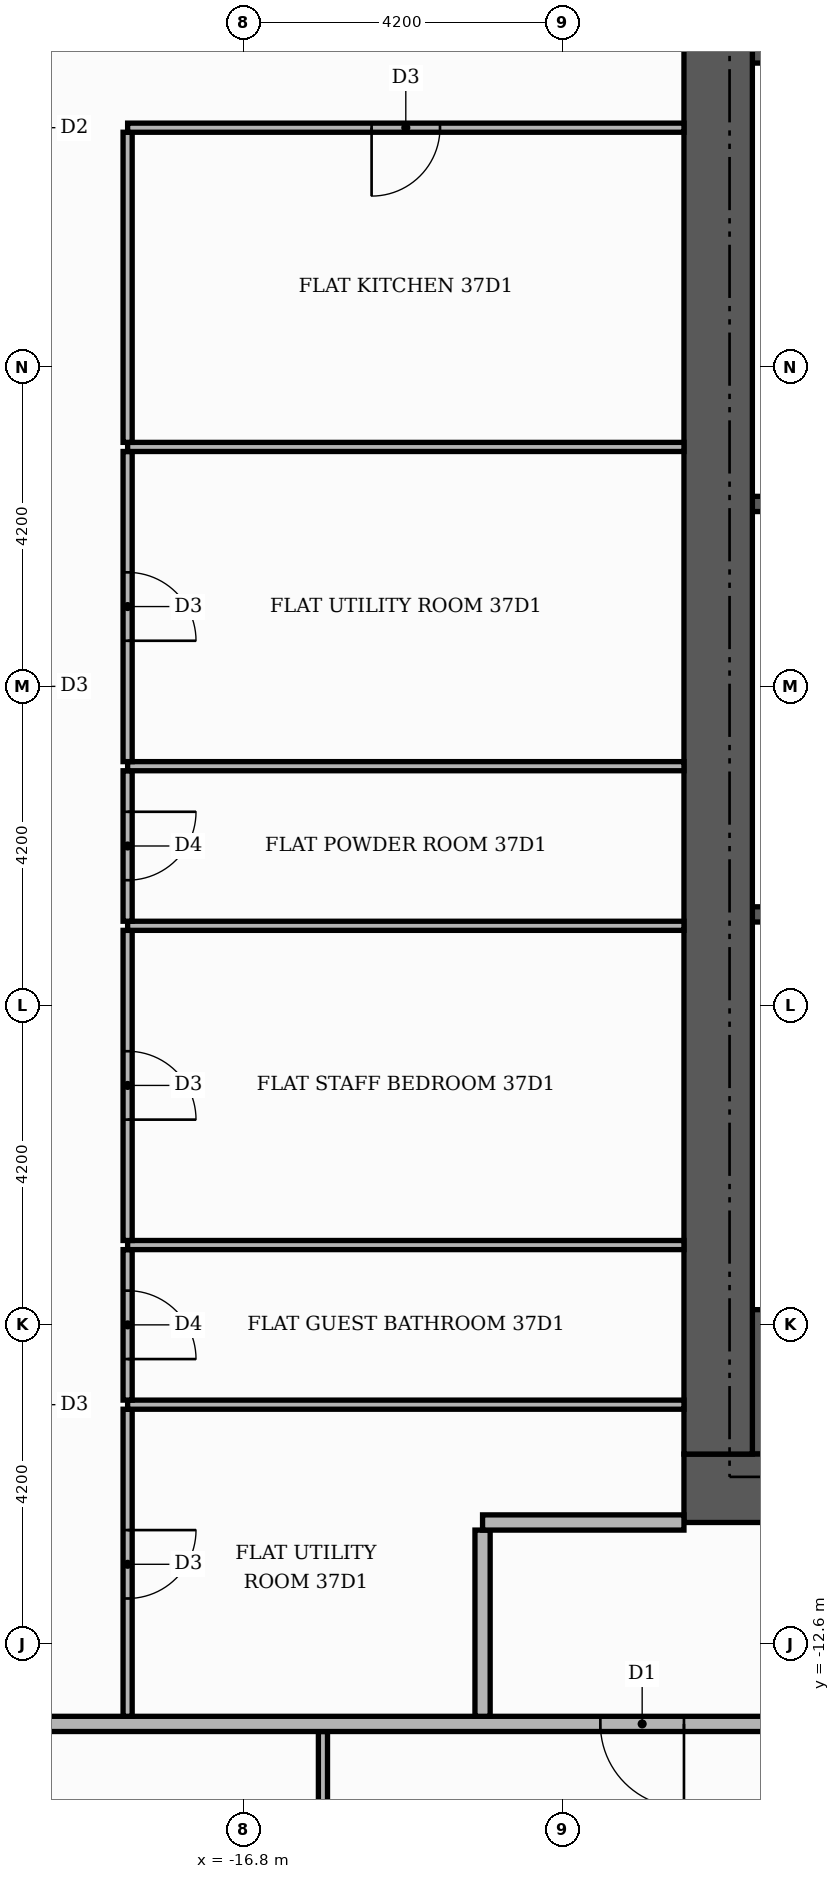
"""IFC4 building model, lengths in metres.
Left out: names, types, materials, properties, quantities, classifications, styles, units other than length and angle.
Written with IfcOpenShell. Run it as: python <this file> out.ifc"""

import sys

from ifc_helpers import new_model, si_unit, direction, frame, frame_2d, origin, place, context, subcontext, project, spatial, rectangle, extrude, element, fill, save


model = new_model("IFC4")
c1 = context("Model", 3, precision=1e-05, world=origin(), true_north=direction((0.0, 1.0)))
c2 = subcontext(c1, "Body", "Model", "MODEL_VIEW")
j1 = project(units=[si_unit("LENGTHUNIT", "METRE"), si_unit("PLANEANGLEUNIT", "RADIAN")], contexts=[c1])
p1 = place(None, origin())
s1 = spatial("IfcSite", under=j1, at=p1, CompositionType="ELEMENT")
p2 = place(p1, origin())
s2 = spatial("IfcBuilding", under=s1, at=p2, CompositionType="ELEMENT")
p3 = place(p2, frame((0.0, 0.0, 157.2)))
s3 = spatial("IfcBuildingStorey", under=s2, at=p3, CompositionType="ELEMENT", Elevation=157.2)
for number, where, z_axis, x_axis in (
    (1, (-10.1, -9.15, 0.0), (0.0, 0.0, 1.0), (1.0, 0.0, 0.0)),
    (2, (-10.1, 9.15, 0.0), (0.0, 0.0, 1.0), (1.0, 0.0, 0.0)),
):
    element("IfcWall", number, at=place(p3, frame(where, z_axis=z_axis, x_axis=x_axis)), inside=s3, PredefinedType="SHEAR", context=c2, shape_type="SweptSolid", body=[
        extrude(rectangle(XDim=4.6, YDim=1.9, at=frame_2d((2.3, 0.0))), origin(), (0.0, 0.0, 1.0), 3.48),
    ])
for number, where, z_axis, x_axis in (
    (3, (-10.1, -3.0, 0.0), (0.0, 0.0, 1.0), (1.0, 0.0, 0.0)),
    (4, (-10.1, 2.4, 0.0), (0.0, 0.0, 1.0), (1.0, 0.0, 0.0)),
):
    element("IfcWall", number, at=place(p3, frame(where, z_axis=z_axis, x_axis=x_axis)), inside=s3, PredefinedType="SHEAR", context=c2, shape_type="SweptSolid", body=[
        extrude(rectangle(XDim=0.9, YDim=0.2, at=frame_2d((0.45, 0.0))), origin(), (0.0, 0.0, 1.0), 3.48),
    ])
p4 = place(p3, frame((-11.0, -10.55, 0.0), z_axis=(0.0, 0.0, 1.0), x_axis=(1.0, 0.0, 0.0)))
e5 = element("IfcWall", 5, at=p4, inside=s3, PredefinedType="SHEAR", context=c2, shape_type="SweptSolid", body=[
    extrude(rectangle(XDim=22.0, YDim=0.9, at=frame_2d((11.0, 0.0))), origin(), (0.0, 0.0, 1.0), 3.48),
])
p5 = place(p4, frame((7.4, 0.0, 0.0)))
e6 = element("IfcOpeningElement", 6, at=p5, cuts=e5, PredefinedType="OPENING", context=c2, shape_type="SweptSolid", body=[
    extrude(rectangle(XDim=1.8, YDim=2.2, at=frame_2d((0.9, 1.1))), frame((0.0, 0.46, 0.0), z_axis=(0.0, -1.0, 0.0), x_axis=(1.0, 0.0, 0.0)), (0.0, 0.0, 1.0), 0.92),
])
p6 = place(p3, frame((-10.55, -10.1, 0.0), z_axis=(0.0, 0.0, 1.0), x_axis=(0.0, 1.0, 0.0)))
e7 = element("IfcWall", 7, at=p6, inside=s3, PredefinedType="SHEAR", context=c2, shape_type="SweptSolid", body=[
    extrude(rectangle(XDim=20.2, YDim=0.9, at=frame_2d((10.1, 0.0))), origin(), (0.0, 0.0, 1.0), 3.48),
])
p7 = place(p3, frame((-15.75, -20.06, 0.0), z_axis=(0.0, 0.0, 1.0), x_axis=(0.0, 1.0, 0.0)))
e8 = element("IfcWall", 8, at=p7, inside=s3, PredefinedType="PARTITIONING", context=c2, shape_type="SweptSolid", body=[
    extrude(rectangle(XDim=6.31, YDim=0.12, at=frame_2d((3.155, 0.0))), origin(), (0.0, 0.0, 1.0), 3.48),
])
p8 = place(p7, frame((2.675, 0.0, 0.0)))
e9 = element("IfcOpeningElement", 9, at=p8, cuts=e8, PredefinedType="OPENING", context=c2, shape_type="SweptSolid", body=[
    extrude(rectangle(XDim=1.0, YDim=2.1, at=frame_2d((0.5, 1.05))), frame((0.0, 0.07, 0.0), z_axis=(0.0, -1.0, 0.0), x_axis=(1.0, 0.0, 0.0)), (0.0, 0.0, 1.0), 0.14),
])
p9 = place(p3, frame((-25.42, -13.65, 0.0), z_axis=(0.0, 0.0, 1.0), x_axis=(1.0, 0.0, 0.0)))
e10 = element("IfcWall", 10, at=p9, inside=s3, PredefinedType="PARTITIONING", context=c2, shape_type="SweptSolid", body=[
    extrude(rectangle(XDim=39.07, YDim=0.2, at=frame_2d((19.535, 0.0))), origin(), (0.0, 0.0, 1.0), 3.48),
])
p10 = place(p9, frame((13.32, 0.0, 0.0)))
e11 = element("IfcOpeningElement", 11, at=p10, cuts=e10, PredefinedType="OPENING", context=c2, shape_type="SweptSolid", body=[
    extrude(rectangle(XDim=1.1, YDim=2.4, at=frame_2d((0.55, 1.2))), frame((0.0, 0.11, 0.0), z_axis=(0.0, -1.0, 0.0), x_axis=(1.0, 0.0, 0.0)), (0.0, 0.0, 1.0), 0.22),
])
p11 = place(p9, frame((21.72, 0.0, 0.0)))
e12 = element("IfcOpeningElement", 12, at=p11, cuts=e10, PredefinedType="OPENING", context=c2, shape_type="SweptSolid", body=[
    extrude(rectangle(XDim=1.1, YDim=2.4, at=frame_2d((0.55, 1.2))), frame((0.0, 0.11, 0.0), z_axis=(0.0, -1.0, 0.0), x_axis=(1.0, 0.0, 0.0)), (0.0, 0.0, 1.0), 0.22),
])
p12 = place(p3, frame((-18.32, -13.55, 0.0), z_axis=(0.0, 0.0, 1.0), x_axis=(0.0, 1.0, 0.0)))
e13 = element("IfcWall", 13, at=p12, inside=s3, PredefinedType="PARTITIONING", context=c2, shape_type="SweptSolid", body=[
    extrude(rectangle(XDim=4.04, YDim=0.12, at=frame_2d((2.02, 0.0))), origin(), (0.0, 0.0, 1.0), 3.48),
])
p13 = place(p12, frame((1.55, 0.0, 0.0)))
e14 = element("IfcOpeningElement", 14, at=p13, cuts=e13, PredefinedType="OPENING", context=c2, shape_type="SweptSolid", body=[
    extrude(rectangle(XDim=0.9, YDim=2.1, at=frame_2d((0.45, 1.05))), frame((0.0, 0.07, 0.0), z_axis=(0.0, -1.0, 0.0), x_axis=(1.0, 0.0, 0.0)), (0.0, 0.0, 1.0), 0.14),
])
p14 = place(p3, frame((-13.65, -13.55, 0.0), z_axis=(0.0, 0.0, 1.0), x_axis=(0.0, 1.0, 0.0)))
e15 = element("IfcWall", 15, at=p14, inside=s3, PredefinedType="PARTITIONING", context=c2, shape_type="SweptSolid", body=[
    extrude(rectangle(XDim=2.45, YDim=0.2, at=frame_2d((1.225, 0.0))), origin(), (0.0, 0.0, 1.0), 3.48),
])
p15 = place(p3, frame((-13.65, -11.0, 0.0), z_axis=(0.0, 0.0, 1.0), x_axis=(1.0, 0.0, 0.0)))
e16 = element("IfcWall", 16, at=p15, inside=s3, PredefinedType="PARTITIONING", context=c2, shape_type="SweptSolid", body=[
    extrude(rectangle(XDim=2.65, YDim=0.2, at=frame_2d((1.325, 0.0))), origin(), (0.0, 0.0, 1.0), 3.48),
])
p16 = place(p3, frame((-18.32, -9.45, 0.0), z_axis=(0.0, 0.0, 1.0), x_axis=(1.0, 0.0, 0.0)))
e17 = element("IfcWall", 17, at=p16, inside=s3, PredefinedType="PARTITIONING", context=c2, shape_type="SweptSolid", body=[
    extrude(rectangle(XDim=7.32, YDim=0.12, at=frame_2d((3.66, 0.0))), origin(), (0.0, 0.0, 1.0), 3.48),
])
p17 = place(p3, frame((-18.32, -9.39, 0.0), z_axis=(0.0, 0.0, 1.0), x_axis=(0.0, 1.0, 0.0)))
e18 = element("IfcWall", 18, at=p17, inside=s3, PredefinedType="PARTITIONING", context=c2, shape_type="SweptSolid", body=[
    extrude(rectangle(XDim=1.98, YDim=0.12, at=frame_2d((0.99, 0.0))), origin(), (0.0, 0.0, 1.0), 3.48),
])
p18 = place(p17, frame((0.54, 0.0, 0.0)))
e19 = element("IfcOpeningElement", 19, at=p18, cuts=e18, PredefinedType="OPENING", context=c2, shape_type="SweptSolid", body=[
    extrude(rectangle(XDim=0.9, YDim=2.1, at=frame_2d((0.45, 1.05))), frame((0.0, 0.07, 0.0), z_axis=(0.0, -1.0, 0.0), x_axis=(1.0, 0.0, 0.0)), (0.0, 0.0, 1.0), 0.14),
])
p19 = place(p3, frame((-18.32, -7.35, 0.0), z_axis=(0.0, 0.0, 1.0), x_axis=(1.0, 0.0, 0.0)))
e20 = element("IfcWall", 20, at=p19, inside=s3, PredefinedType="PARTITIONING", context=c2, shape_type="SweptSolid", body=[
    extrude(rectangle(XDim=7.32, YDim=0.12, at=frame_2d((3.66, 0.0))), origin(), (0.0, 0.0, 1.0), 3.48),
])
p20 = place(p3, frame((-18.32, -7.29, 0.0), z_axis=(0.0, 0.0, 1.0), x_axis=(0.0, 1.0, 0.0)))
e21 = element("IfcWall", 21, at=p20, inside=s3, PredefinedType="PARTITIONING", context=c2, shape_type="SweptSolid", body=[
    extrude(rectangle(XDim=4.08, YDim=0.12, at=frame_2d((2.04, 0.0))), origin(), (0.0, 0.0, 1.0), 3.48),
])
p21 = place(p20, frame((1.59, 0.0, 0.0)))
e22 = element("IfcOpeningElement", 22, at=p21, cuts=e21, PredefinedType="OPENING", context=c2, shape_type="SweptSolid", body=[
    extrude(rectangle(XDim=0.9, YDim=2.1, at=frame_2d((0.45, 1.05))), frame((0.0, 0.07, 0.0), z_axis=(0.0, -1.0, 0.0), x_axis=(1.0, 0.0, 0.0)), (0.0, 0.0, 1.0), 0.14),
])
p22 = place(p3, frame((-18.32, -3.15, 0.0), z_axis=(0.0, 0.0, 1.0), x_axis=(1.0, 0.0, 0.0)))
e23 = element("IfcWall", 23, at=p22, inside=s3, PredefinedType="PARTITIONING", context=c2, shape_type="SweptSolid", body=[
    extrude(rectangle(XDim=7.32, YDim=0.12, at=frame_2d((3.66, 0.0))), origin(), (0.0, 0.0, 1.0), 3.48),
])
p23 = place(p3, frame((-18.32, -3.09, 0.0), z_axis=(0.0, 0.0, 1.0), x_axis=(0.0, 1.0, 0.0)))
e24 = element("IfcWall", 24, at=p23, inside=s3, PredefinedType="PARTITIONING", context=c2, shape_type="SweptSolid", body=[
    extrude(rectangle(XDim=1.98, YDim=0.12, at=frame_2d((0.99, 0.0))), origin(), (0.0, 0.0, 1.0), 3.48),
])
p24 = place(p23, frame((0.54, 0.0, 0.0)))
e25 = element("IfcOpeningElement", 25, at=p24, cuts=e24, PredefinedType="OPENING", context=c2, shape_type="SweptSolid", body=[
    extrude(rectangle(XDim=0.9, YDim=2.1, at=frame_2d((0.45, 1.05))), frame((0.0, 0.07, 0.0), z_axis=(0.0, -1.0, 0.0), x_axis=(1.0, 0.0, 0.0)), (0.0, 0.0, 1.0), 0.14),
])
p25 = place(p3, frame((-18.32, -1.05, 0.0), z_axis=(0.0, 0.0, 1.0), x_axis=(1.0, 0.0, 0.0)))
e26 = element("IfcWall", 26, at=p25, inside=s3, PredefinedType="PARTITIONING", context=c2, shape_type="SweptSolid", body=[
    extrude(rectangle(XDim=7.32, YDim=0.12, at=frame_2d((3.66, 0.0))), origin(), (0.0, 0.0, 1.0), 3.48),
])
p26 = place(p3, frame((-18.32, -0.99, 0.0), z_axis=(0.0, 0.0, 1.0), x_axis=(0.0, 1.0, 0.0)))
e27 = element("IfcWall", 27, at=p26, inside=s3, PredefinedType="PARTITIONING", context=c2, shape_type="SweptSolid", body=[
    extrude(rectangle(XDim=4.08, YDim=0.12, at=frame_2d((2.04, 0.0))), origin(), (0.0, 0.0, 1.0), 3.48),
])
p27 = place(p26, frame((1.59, 0.0, 0.0)))
e28 = element("IfcOpeningElement", 28, at=p27, cuts=e27, PredefinedType="OPENING", context=c2, shape_type="SweptSolid", body=[
    extrude(rectangle(XDim=0.9, YDim=2.1, at=frame_2d((0.45, 1.05))), frame((0.0, 0.07, 0.0), z_axis=(0.0, -1.0, 0.0), x_axis=(1.0, 0.0, 0.0)), (0.0, 0.0, 1.0), 0.14),
])
p28 = place(p3, frame((-18.32, 3.15, 0.0), z_axis=(0.0, 0.0, 1.0), x_axis=(1.0, 0.0, 0.0)))
e29 = element("IfcWall", 29, at=p28, inside=s3, PredefinedType="PARTITIONING", context=c2, shape_type="SweptSolid", body=[
    extrude(rectangle(XDim=7.32, YDim=0.12, at=frame_2d((3.66, 0.0))), origin(), (0.0, 0.0, 1.0), 3.48),
])
p29 = place(p3, frame((-18.32, 3.21, 0.0), z_axis=(0.0, 0.0, 1.0), x_axis=(0.0, 1.0, 0.0)))
e30 = element("IfcWall", 30, at=p29, inside=s3, PredefinedType="PARTITIONING", context=c2, shape_type="SweptSolid", body=[
    extrude(rectangle(XDim=4.08, YDim=0.12, at=frame_2d((2.04, 0.0))), origin(), (0.0, 0.0, 1.0), 3.48),
])
p30 = place(p3, frame((-18.32, 7.35, 0.0), z_axis=(0.0, 0.0, 1.0), x_axis=(1.0, 0.0, 0.0)))
e31 = element("IfcWall", 31, at=p30, inside=s3, PredefinedType="PARTITIONING", context=c2, shape_type="SweptSolid", body=[
    extrude(rectangle(XDim=7.32, YDim=0.12, at=frame_2d((3.66, 0.0))), origin(), (0.0, 0.0, 1.0), 3.48),
])
p31 = place(p30, frame((3.21, 0.0, 0.0)))
e32 = element("IfcOpeningElement", 32, at=p31, cuts=e31, PredefinedType="OPENING", context=c2, shape_type="SweptSolid", body=[
    extrude(rectangle(XDim=0.9, YDim=2.1, at=frame_2d((0.45, 1.05))), frame((0.0, 0.07, 0.0), z_axis=(0.0, -1.0, 0.0), x_axis=(1.0, 0.0, 0.0)), (0.0, 0.0, 1.0), 0.14),
])
p32 = place(p10, frame((1.1, 0.0, 0.0), z_axis=(0.0, 0.0, 1.0), x_axis=(-1.0, 0.0, 0.0)))
e33 = element("IfcDoor", 33, at=p32, inside=s3, OperationType="SINGLE_SWING_RIGHT", PredefinedType="DOOR", context=c2, shape_type="SweptSolid", body=[
    extrude(rectangle(XDim=1.1, YDim=2.4, at=frame_2d((0.55, 1.2))), frame((0.0, 0.025, 0.0), z_axis=(0.0, -1.0, 0.0), x_axis=(1.0, 0.0, 0.0)), (0.0, 0.0, 1.0), 0.05),
])
fill(e11, e33)
p33 = place(p31, frame((0.9, 0.0, 0.0), z_axis=(0.0, 0.0, 1.0), x_axis=(-1.0, 0.0, 0.0)))
e34 = element("IfcDoor", 34, at=p33, inside=s3, OperationType="SINGLE_SWING_LEFT", PredefinedType="DOOR", context=c2, shape_type="SweptSolid", body=[
    extrude(rectangle(XDim=0.9, YDim=2.1, at=frame_2d((0.45, 1.05))), frame((0.0, 0.025, 0.0), z_axis=(0.0, -1.0, 0.0), x_axis=(1.0, 0.0, 0.0)), (0.0, 0.0, 1.0), 0.05),
])
fill(e32, e34)
p34 = place(p27, frame((0.9, 0.0, 0.0), z_axis=(0.0, 0.0, 1.0), x_axis=(-1.0, 0.0, 0.0)))
e35 = element("IfcDoor", 35, at=p34, inside=s3, OperationType="SINGLE_SWING_LEFT", PredefinedType="DOOR", context=c2, shape_type="SweptSolid", body=[
    extrude(rectangle(XDim=0.9, YDim=2.1, at=frame_2d((0.45, 1.05))), frame((0.0, 0.025, 0.0), z_axis=(0.0, -1.0, 0.0), x_axis=(1.0, 0.0, 0.0)), (0.0, 0.0, 1.0), 0.05),
])
fill(e28, e35)
p35 = place(p24, frame((0.9, 0.0, 0.0), z_axis=(0.0, 0.0, 1.0), x_axis=(-1.0, 0.0, 0.0)))
e36 = element("IfcDoor", 36, at=p35, inside=s3, OperationType="SINGLE_SWING_RIGHT", PredefinedType="DOOR", context=c2, shape_type="SweptSolid", body=[
    extrude(rectangle(XDim=0.9, YDim=2.1, at=frame_2d((0.45, 1.05))), frame((0.0, 0.025, 0.0), z_axis=(0.0, -1.0, 0.0), x_axis=(1.0, 0.0, 0.0)), (0.0, 0.0, 1.0), 0.05),
])
fill(e25, e36)
p36 = place(p21, frame((0.9, 0.0, 0.0), z_axis=(0.0, 0.0, 1.0), x_axis=(-1.0, 0.0, 0.0)))
e37 = element("IfcDoor", 37, at=p36, inside=s3, OperationType="SINGLE_SWING_LEFT", PredefinedType="DOOR", context=c2, shape_type="SweptSolid", body=[
    extrude(rectangle(XDim=0.9, YDim=2.1, at=frame_2d((0.45, 1.05))), frame((0.0, 0.025, 0.0), z_axis=(0.0, -1.0, 0.0), x_axis=(1.0, 0.0, 0.0)), (0.0, 0.0, 1.0), 0.05),
])
fill(e22, e37)
p37 = place(p18, frame((0.9, 0.0, 0.0), z_axis=(0.0, 0.0, 1.0), x_axis=(-1.0, 0.0, 0.0)))
e38 = element("IfcDoor", 38, at=p37, inside=s3, OperationType="SINGLE_SWING_LEFT", PredefinedType="DOOR", context=c2, shape_type="SweptSolid", body=[
    extrude(rectangle(XDim=0.9, YDim=2.1, at=frame_2d((0.45, 1.05))), frame((0.0, 0.025, 0.0), z_axis=(0.0, -1.0, 0.0), x_axis=(1.0, 0.0, 0.0)), (0.0, 0.0, 1.0), 0.05),
])
fill(e19, e38)
p38 = place(p13, frame((0.9, 0.0, 0.0), z_axis=(0.0, 0.0, 1.0), x_axis=(-1.0, 0.0, 0.0)))
e39 = element("IfcDoor", 39, at=p38, inside=s3, OperationType="SINGLE_SWING_RIGHT", PredefinedType="DOOR", context=c2, shape_type="SweptSolid", body=[
    extrude(rectangle(XDim=0.9, YDim=2.1, at=frame_2d((0.45, 1.05))), frame((0.0, 0.025, 0.0), z_axis=(0.0, -1.0, 0.0), x_axis=(1.0, 0.0, 0.0)), (0.0, 0.0, 1.0), 0.05),
])
fill(e14, e39)
save(model, sys.argv[1])
